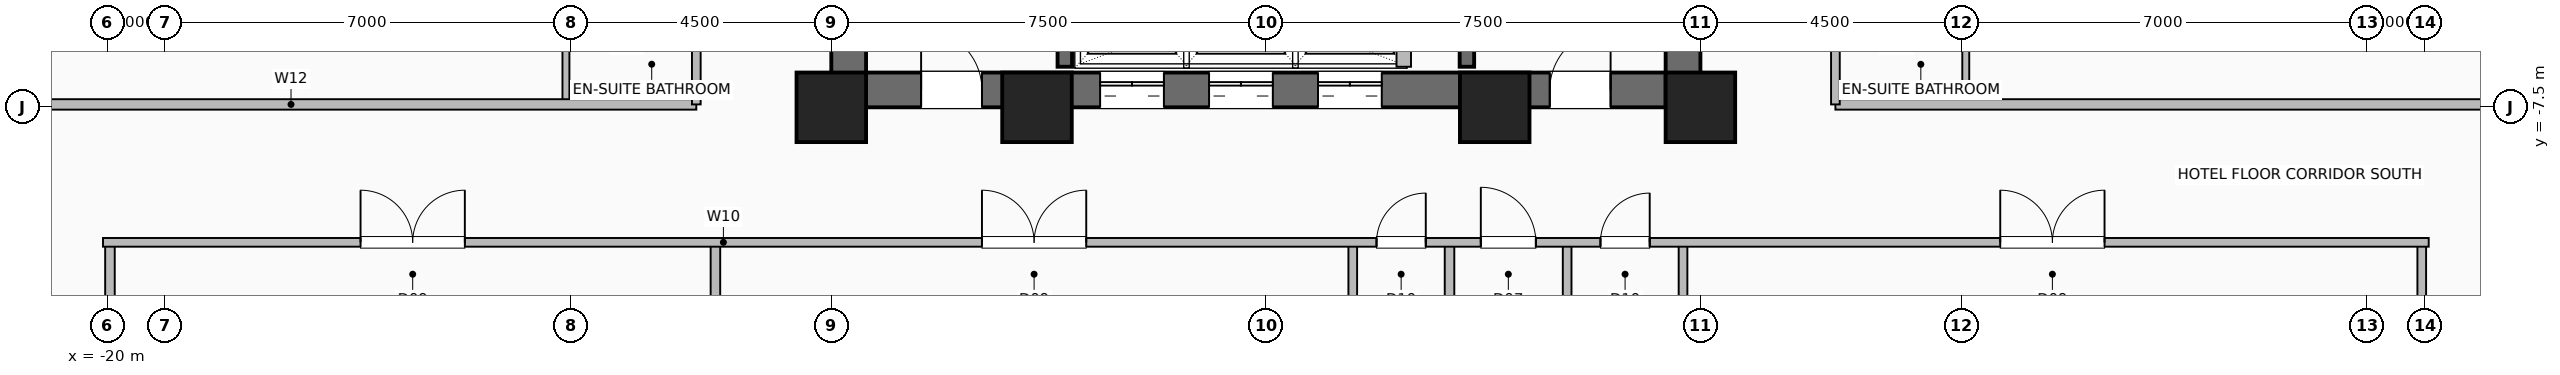
"""IFC4 building model, lengths in metres.
Left out: names, types, materials, properties, quantities, classifications, styles, units other than length and angle.
Written with IfcOpenShell. Run it as: python <this file> out.ifc"""

import sys

from ifc_helpers import new_model, si_unit, direction, frame, frame_2d, origin, origin_2d, place, context, subcontext, project, spatial, rectangle, hollow_rectangle, extrude, element, fill, save


model = new_model("IFC4")
c1 = context("Model", 3, precision=1e-05, world=origin(), true_north=direction((0.0, 1.0)))
c2 = subcontext(c1, "Body", "Model", "MODEL_VIEW")
j1 = project(units=[si_unit("LENGTHUNIT", "METRE"), si_unit("PLANEANGLEUNIT", "RADIAN")], contexts=[c1])
p1 = place(None, origin())
s1 = spatial("IfcSite", under=j1, at=p1, CompositionType="ELEMENT")
p2 = place(p1, origin())
s2 = spatial("IfcBuilding", under=s1, at=p2, CompositionType="ELEMENT")
p3 = place(p2, frame((0.0, 0.0, 51.5)))
s3 = spatial("IfcBuildingStorey", under=s2, at=p3, CompositionType="ELEMENT", Elevation=51.5)
for number, where, z_axis, x_axis in (
    (1, (-7.5, -7.5, 0.0), (0.0, 0.0, 1.0), (1.0, 0.0, 0.0)),
    (2, (-3.95, -7.5, 0.0), (0.0, 0.0, 1.0), (1.0, 0.0, 0.0)),
    (3, (3.95, -7.5, 0.0), (0.0, 0.0, 1.0), (1.0, 0.0, 0.0)),
    (4, (7.5, -7.5, 0.0), (0.0, 0.0, 1.0), (1.0, 0.0, 0.0)),
):
    element("IfcColumn", number, at=place(p3, frame(where, z_axis=z_axis, x_axis=x_axis)), inside=s3, PredefinedType="COLUMN", context=c2, shape_type="SweptSolid", body=[
        extrude(hollow_rectangle(XDim=1.2, YDim=1.2, WallThickness=0.055, at=origin_2d()), origin(), (0.0, 0.0, 1.0), 3.5),
    ])
p4 = place(p3, frame((-7.5, -7.2, 0.0), z_axis=(0.0, 0.0, 1.0), x_axis=(1.0, 0.0, 0.0)))
e5 = element("IfcWall", 5, at=p4, inside=s3, PredefinedType="SHEAR", context=c2, shape_type="SweptSolid", body=[
    extrude(rectangle(XDim=15.0, YDim=0.6, at=frame_2d((7.5, 0.0))), origin(), (0.0, 0.0, 1.0), 3.25),
])
p5 = place(p4, frame((1.55, 0.0, 0.0)))
e6 = element("IfcOpeningElement", 6, at=p5, cuts=e5, PredefinedType="OPENING", context=c2, shape_type="SweptSolid", body=[
    extrude(rectangle(XDim=1.05, YDim=2.08, at=frame_2d((0.525, 1.04))), frame((0.0, 0.31, 0.0), z_axis=(0.0, -1.0, 0.0), x_axis=(1.0, 0.0, 0.0)), (0.0, 0.0, 1.0), 0.62),
])
p6 = place(p4, frame((12.4, 0.0, 0.0)))
e7 = element("IfcOpeningElement", 7, at=p6, cuts=e5, PredefinedType="OPENING", context=c2, shape_type="SweptSolid", body=[
    extrude(rectangle(XDim=1.05, YDim=2.08, at=frame_2d((0.525, 1.04))), frame((0.0, 0.31, 0.0), z_axis=(0.0, -1.0, 0.0), x_axis=(1.0, 0.0, 0.0)), (0.0, 0.0, 1.0), 0.62),
])
p7 = place(p4, frame((4.64, 0.0, 0.0)))
e8 = element("IfcOpeningElement", 8, at=p7, cuts=e5, PredefinedType="OPENING", context=c2, shape_type="SweptSolid", body=[
    extrude(rectangle(XDim=1.1, YDim=2.2, at=frame_2d((0.55, 1.1))), frame((0.0, 0.31, 0.0), z_axis=(0.0, -1.0, 0.0), x_axis=(1.0, 0.0, 0.0)), (0.0, 0.0, 1.0), 0.62),
])
p8 = place(p4, frame((6.52, 0.0, 0.0)))
e9 = element("IfcOpeningElement", 9, at=p8, cuts=e5, PredefinedType="OPENING", context=c2, shape_type="SweptSolid", body=[
    extrude(rectangle(XDim=1.1, YDim=2.2, at=frame_2d((0.55, 1.1))), frame((0.0, 0.31, 0.0), z_axis=(0.0, -1.0, 0.0), x_axis=(1.0, 0.0, 0.0)), (0.0, 0.0, 1.0), 0.62),
])
p9 = place(p4, frame((8.4, 0.0, 0.0)))
e10 = element("IfcOpeningElement", 10, at=p9, cuts=e5, PredefinedType="OPENING", context=c2, shape_type="SweptSolid", body=[
    extrude(rectangle(XDim=1.1, YDim=2.2, at=frame_2d((0.55, 1.1))), frame((0.0, 0.31, 0.0), z_axis=(0.0, -1.0, 0.0), x_axis=(1.0, 0.0, 0.0)), (0.0, 0.0, 1.0), 0.62),
])
p10 = place(p3, frame((-7.2, -7.5, 0.0), z_axis=(0.0, 0.0, 1.0), x_axis=(0.0, 1.0, 0.0)))
e11 = element("IfcWall", 11, at=p10, inside=s3, PredefinedType="SHEAR", context=c2, shape_type="SweptSolid", body=[
    extrude(rectangle(XDim=15.0, YDim=0.6, at=frame_2d((7.5, 0.0))), origin(), (0.0, 0.0, 1.0), 3.25),
])
p11 = place(p10, frame((9.5, 0.0, 0.0)))
e12 = element("IfcOpeningElement", 12, at=p11, cuts=e11, PredefinedType="OPENING", context=c2, shape_type="SweptSolid", body=[
    extrude(rectangle(XDim=1.0, YDim=2.08, at=frame_2d((0.5, 1.04))), frame((0.0, 0.31, 0.0), z_axis=(0.0, -1.0, 0.0), x_axis=(1.0, 0.0, 0.0)), (0.0, 0.0, 1.0), 0.62),
])
p12 = place(p3, frame((7.2, -7.5, 0.0), z_axis=(0.0, 0.0, 1.0), x_axis=(0.0, 1.0, 0.0)))
e13 = element("IfcWall", 13, at=p12, inside=s3, PredefinedType="SHEAR", context=c2, shape_type="SweptSolid", body=[
    extrude(rectangle(XDim=15.0, YDim=0.6, at=frame_2d((7.5, 0.0))), origin(), (0.0, 0.0, 1.0), 3.25),
])
for number, where, z_axis, x_axis in (
    (14, (-3.47, -6.8, 0.0), (0.0, 0.0, 1.0), (0.0, 1.0, 0.0)),
    (15, (3.47, -6.8, 0.0), (0.0, 0.0, 1.0), (0.0, 1.0, 0.0)),
):
    element("IfcWall", number, at=place(p3, frame(where, z_axis=z_axis, x_axis=x_axis)), inside=s3, PredefinedType="SHEAR", context=c2, shape_type="SweptSolid", body=[
        extrude(rectangle(XDim=7.72, YDim=0.25, at=frame_2d((3.86, 0.0))), origin(), (0.0, 0.0, 1.0), 3.25),
    ])
p13 = place(p3, frame((2.38, -6.8, 0.0), z_axis=(0.0, 0.0, 1.0), x_axis=(0.0, 1.0, 0.0)))
e16 = element("IfcWall", 16, at=p13, inside=s3, PredefinedType="SHEAR", context=c2, shape_type="SweptSolid", body=[
    extrude(rectangle(XDim=2.22, YDim=0.25, at=frame_2d((1.11, 0.0))), origin(), (0.0, 0.0, 1.0), 3.25),
])
for number, where, z_axis, x_axis in (
    (17, (3.17, -23.82, 0.0), (0.0, 0.0, 1.0), (0.0, 1.0, 0.0)),
    (18, (-19.95, -23.82, 0.0), (0.0, 0.0, 1.0), (0.0, 1.0, 0.0)),
    (19, (-9.5, -23.82, 0.0), (0.0, 0.0, 1.0), (0.0, 1.0, 0.0)),
):
    element("IfcWall", number, at=place(p3, frame(where, z_axis=z_axis, x_axis=x_axis)), inside=s3, PredefinedType="PLUMBINGWALL", context=c2, shape_type="SweptSolid", body=[
        extrude(rectangle(XDim=13.99, YDim=0.165, at=frame_2d((6.995, 0.0))), origin(), (0.0, 0.0, 1.0), 3.25),
    ])
for number, where, z_axis, x_axis in (
    (20, (1.5, -23.82, 0.0), (0.0, 0.0, 1.0), (0.0, 1.0, 0.0)),
    (21, (5.2, -23.82, 0.0), (0.0, 0.0, 1.0), (0.0, 1.0, 0.0)),
    (22, (7.2, -23.82, 0.0), (0.0, 0.0, 1.0), (0.0, 1.0, 0.0)),
    (23, (19.95, -23.82, 0.0), (0.0, 0.0, 1.0), (0.0, 1.0, 0.0)),
):
    element("IfcWall", number, at=place(p3, frame(where, z_axis=z_axis, x_axis=x_axis)), inside=s3, PredefinedType="PARTITIONING", context=c2, shape_type="SweptSolid", body=[
        extrude(rectangle(XDim=13.99, YDim=0.15, at=frame_2d((6.995, 0.0))), origin(), (0.0, 0.0, 1.0), 3.25),
    ])
p14 = place(p3, frame((-20.07, -9.83, 0.0), z_axis=(0.0, 0.0, 1.0), x_axis=(1.0, 0.0, 0.0)))
e24 = element("IfcWall", 24, at=p14, inside=s3, PredefinedType="PARTITIONING", context=c2, shape_type="SweptSolid", body=[
    extrude(rectangle(XDim=40.14, YDim=0.15, at=frame_2d((20.07, 0.0))), origin(), (0.0, 0.0, 1.0), 3.25),
])
p15 = place(p14, frame((4.445, 0.0, 0.0)))
e25 = element("IfcOpeningElement", 25, at=p15, cuts=e24, PredefinedType="OPENING", context=c2, shape_type="SweptSolid", body=[
    extrude(rectangle(XDim=1.8, YDim=2.08, at=frame_2d((0.9, 1.04))), frame((0.0, 0.085, 0.0), z_axis=(0.0, -1.0, 0.0), x_axis=(1.0, 0.0, 0.0)), (0.0, 0.0, 1.0), 0.17),
])
p16 = place(p14, frame((15.17, 0.0, 0.0)))
e26 = element("IfcOpeningElement", 26, at=p16, cuts=e24, PredefinedType="OPENING", context=c2, shape_type="SweptSolid", body=[
    extrude(rectangle(XDim=1.8, YDim=2.08, at=frame_2d((0.9, 1.04))), frame((0.0, 0.085, 0.0), z_axis=(0.0, -1.0, 0.0), x_axis=(1.0, 0.0, 0.0)), (0.0, 0.0, 1.0), 0.17),
])
p17 = place(p14, frame((21.98, 0.0, 0.0)))
e27 = element("IfcOpeningElement", 27, at=p17, cuts=e24, PredefinedType="OPENING", context=c2, shape_type="SweptSolid", body=[
    extrude(rectangle(XDim=0.85, YDim=2.05, at=frame_2d((0.425, 1.025))), frame((0.0, 0.085, 0.0), z_axis=(0.0, -1.0, 0.0), x_axis=(1.0, 0.0, 0.0)), (0.0, 0.0, 1.0), 0.17),
])
p18 = place(p14, frame((23.78, 0.0, 0.0)))
e28 = element("IfcOpeningElement", 28, at=p18, cuts=e24, PredefinedType="OPENING", context=c2, shape_type="SweptSolid", body=[
    extrude(rectangle(XDim=0.95, YDim=2.06, at=frame_2d((0.475, 1.03))), frame((0.0, 0.085, 0.0), z_axis=(0.0, -1.0, 0.0), x_axis=(1.0, 0.0, 0.0)), (0.0, 0.0, 1.0), 0.17),
])
p19 = place(p14, frame((25.845, 0.0, 0.0)))
e29 = element("IfcOpeningElement", 29, at=p19, cuts=e24, PredefinedType="OPENING", context=c2, shape_type="SweptSolid", body=[
    extrude(rectangle(XDim=0.85, YDim=2.05, at=frame_2d((0.425, 1.025))), frame((0.0, 0.085, 0.0), z_axis=(0.0, -1.0, 0.0), x_axis=(1.0, 0.0, 0.0)), (0.0, 0.0, 1.0), 0.17),
])
p20 = place(p14, frame((32.745, 0.0, 0.0)))
e30 = element("IfcOpeningElement", 30, at=p20, cuts=e24, PredefinedType="OPENING", context=c2, shape_type="SweptSolid", body=[
    extrude(rectangle(XDim=1.8, YDim=2.08, at=frame_2d((0.9, 1.04))), frame((0.0, 0.085, 0.0), z_axis=(0.0, -1.0, 0.0), x_axis=(1.0, 0.0, 0.0)), (0.0, 0.0, 1.0), 0.17),
])
p21 = place(p3, frame((-12.08, -7.42, 0.0), z_axis=(0.0, 0.0, 1.0), x_axis=(0.0, 1.0, 0.0)))
e31 = element("IfcWall", 31, at=p21, inside=s3, PredefinedType="PLUMBINGWALL", context=c2, shape_type="SweptSolid", body=[
    extrude(rectangle(XDim=2.008, YDim=0.12, at=frame_2d((1.004, 0.0))), origin(), (0.0, 0.0, 1.0), 3.25),
])
p22 = place(p3, frame((-23.82, -7.45, 0.0), z_axis=(0.0, 0.0, 1.0), x_axis=(1.0, 0.0, 0.0)))
e32 = element("IfcWall", 32, at=p22, inside=s3, PredefinedType="PARTITIONING", context=c2, shape_type="SweptSolid", body=[
    extrude(rectangle(XDim=13.99, YDim=0.18, at=frame_2d((6.995, 0.0))), origin(), (0.0, 0.0, 1.0), 3.25),
])
p23 = place(p3, frame((-9.83, -7.45, 0.0), z_axis=(0.0, 0.0, 1.0), x_axis=(0.0, 1.0, 0.0)))
e33 = element("IfcWall", 33, at=p23, inside=s3, PredefinedType="PARTITIONING", context=c2, shape_type="SweptSolid", body=[
    extrude(rectangle(XDim=14.9, YDim=0.15, at=frame_2d((7.45, 0.0))), origin(), (0.0, 0.0, 1.0), 3.25),
])
p24 = place(p23, frame((3.049, 0.0, 0.0)))
e34 = element("IfcOpeningElement", 34, at=p24, cuts=e33, PredefinedType="OPENING", context=c2, shape_type="SweptSolid", body=[
    extrude(rectangle(XDim=0.95, YDim=2.08, at=frame_2d((0.475, 1.04))), frame((0.0, 0.085, 0.0), z_axis=(0.0, -1.0, 0.0), x_axis=(1.0, 0.0, 0.0)), (0.0, 0.0, 1.0), 0.17),
])
p25 = place(p23, frame((7.927, 0.0, 0.0)))
e35 = element("IfcOpeningElement", 35, at=p25, cuts=e33, PredefinedType="OPENING", context=c2, shape_type="SweptSolid", body=[
    extrude(rectangle(XDim=0.95, YDim=2.08, at=frame_2d((0.475, 1.04))), frame((0.0, 0.085, 0.0), z_axis=(0.0, -1.0, 0.0), x_axis=(1.0, 0.0, 0.0)), (0.0, 0.0, 1.0), 0.17),
])
p26 = place(p23, frame((12.899, 0.0, 0.0)))
e36 = element("IfcOpeningElement", 36, at=p26, cuts=e33, PredefinedType="OPENING", context=c2, shape_type="SweptSolid", body=[
    extrude(rectangle(XDim=0.95, YDim=2.08, at=frame_2d((0.475, 1.04))), frame((0.0, 0.085, 0.0), z_axis=(0.0, -1.0, 0.0), x_axis=(1.0, 0.0, 0.0)), (0.0, 0.0, 1.0), 0.17),
])
p27 = place(p3, frame((12.08, -7.42, 0.0), z_axis=(0.0, 0.0, 1.0), x_axis=(0.0, 1.0, 0.0)))
e37 = element("IfcWall", 37, at=p27, inside=s3, PredefinedType="PLUMBINGWALL", context=c2, shape_type="SweptSolid", body=[
    extrude(rectangle(XDim=2.008, YDim=0.12, at=frame_2d((1.004, 0.0))), origin(), (0.0, 0.0, 1.0), 3.25),
])
p28 = place(p3, frame((9.83, -7.45, 0.0), z_axis=(0.0, 0.0, 1.0), x_axis=(1.0, 0.0, 0.0)))
e38 = element("IfcWall", 38, at=p28, inside=s3, PredefinedType="PARTITIONING", context=c2, shape_type="SweptSolid", body=[
    extrude(rectangle(XDim=13.99, YDim=0.18, at=frame_2d((6.995, 0.0))), origin(), (0.0, 0.0, 1.0), 3.25),
])
p29 = place(p3, frame((9.83, -7.45, 0.0), z_axis=(0.0, 0.0, 1.0), x_axis=(0.0, 1.0, 0.0)))
e39 = element("IfcWall", 39, at=p29, inside=s3, PredefinedType="PARTITIONING", context=c2, shape_type="SweptSolid", body=[
    extrude(rectangle(XDim=14.9, YDim=0.15, at=frame_2d((7.45, 0.0))), origin(), (0.0, 0.0, 1.0), 3.25),
])
p30 = place(p29, frame((3.049, 0.0, 0.0)))
e40 = element("IfcOpeningElement", 40, at=p30, cuts=e39, PredefinedType="OPENING", context=c2, shape_type="SweptSolid", body=[
    extrude(rectangle(XDim=0.95, YDim=2.08, at=frame_2d((0.475, 1.04))), frame((0.0, 0.085, 0.0), z_axis=(0.0, -1.0, 0.0), x_axis=(1.0, 0.0, 0.0)), (0.0, 0.0, 1.0), 0.17),
])
p31 = place(p29, frame((7.927, 0.0, 0.0)))
e41 = element("IfcOpeningElement", 41, at=p31, cuts=e39, PredefinedType="OPENING", context=c2, shape_type="SweptSolid", body=[
    extrude(rectangle(XDim=0.95, YDim=2.08, at=frame_2d((0.475, 1.04))), frame((0.0, 0.085, 0.0), z_axis=(0.0, -1.0, 0.0), x_axis=(1.0, 0.0, 0.0)), (0.0, 0.0, 1.0), 0.17),
])
p32 = place(p29, frame((12.899, 0.0, 0.0)))
e42 = element("IfcOpeningElement", 42, at=p32, cuts=e39, PredefinedType="OPENING", context=c2, shape_type="SweptSolid", body=[
    extrude(rectangle(XDim=0.95, YDim=2.08, at=frame_2d((0.475, 1.04))), frame((0.0, 0.085, 0.0), z_axis=(0.0, -1.0, 0.0), x_axis=(1.0, 0.0, 0.0)), (0.0, 0.0, 1.0), 0.17),
])
p33 = place(p5, origin())
e43 = element("IfcDoor", 43, at=p33, inside=s3, OperationType="SINGLE_SWING_LEFT", PredefinedType="DOOR", context=c2, shape_type="SweptSolid", body=[
    extrude(rectangle(XDim=1.05, YDim=2.08, at=frame_2d((0.525, 1.04))), frame((0.0, 0.025, 0.0), z_axis=(0.0, -1.0, 0.0), x_axis=(1.0, 0.0, 0.0)), (0.0, 0.0, 1.0), 0.05),
])
fill(e6, e43)
p34 = place(p6, origin())
e44 = element("IfcDoor", 44, at=p34, inside=s3, OperationType="SINGLE_SWING_RIGHT", PredefinedType="DOOR", context=c2, shape_type="SweptSolid", body=[
    extrude(rectangle(XDim=1.05, YDim=2.08, at=frame_2d((0.525, 1.04))), frame((0.0, 0.025, 0.0), z_axis=(0.0, -1.0, 0.0), x_axis=(1.0, 0.0, 0.0)), (0.0, 0.0, 1.0), 0.05),
])
fill(e7, e44)
p35 = place(p7, origin())
e45 = element("IfcDoor", 45, at=p35, inside=s3, OperationType="DOUBLE_DOOR_SLIDING", PredefinedType="DOOR", context=c2, shape_type="SweptSolid", body=[
    extrude(rectangle(XDim=1.1, YDim=2.2, at=frame_2d((0.55, 1.1))), frame((0.0, 0.025, 0.0), z_axis=(0.0, -1.0, 0.0), x_axis=(1.0, 0.0, 0.0)), (0.0, 0.0, 1.0), 0.05),
])
fill(e8, e45)
p36 = place(p8, origin())
e46 = element("IfcDoor", 46, at=p36, inside=s3, OperationType="DOUBLE_DOOR_SLIDING", PredefinedType="DOOR", context=c2, shape_type="SweptSolid", body=[
    extrude(rectangle(XDim=1.1, YDim=2.2, at=frame_2d((0.55, 1.1))), frame((0.0, 0.025, 0.0), z_axis=(0.0, -1.0, 0.0), x_axis=(1.0, 0.0, 0.0)), (0.0, 0.0, 1.0), 0.05),
])
fill(e9, e46)
p37 = place(p9, origin())
e47 = element("IfcDoor", 47, at=p37, inside=s3, OperationType="DOUBLE_DOOR_SLIDING", PredefinedType="DOOR", context=c2, shape_type="SweptSolid", body=[
    extrude(rectangle(XDim=1.1, YDim=2.2, at=frame_2d((0.55, 1.1))), frame((0.0, 0.025, 0.0), z_axis=(0.0, -1.0, 0.0), x_axis=(1.0, 0.0, 0.0)), (0.0, 0.0, 1.0), 0.05),
])
fill(e10, e47)
p38 = place(p15, origin())
e48 = element("IfcDoor", 48, at=p38, inside=s3, OperationType="DOUBLE_DOOR_SINGLE_SWING", PredefinedType="DOOR", context=c2, shape_type="SweptSolid", body=[
    extrude(rectangle(XDim=1.8, YDim=2.08, at=frame_2d((0.9, 1.04))), frame((0.0, 0.025, 0.0), z_axis=(0.0, -1.0, 0.0), x_axis=(1.0, 0.0, 0.0)), (0.0, 0.0, 1.0), 0.05),
])
fill(e25, e48)
p39 = place(p16, origin())
e49 = element("IfcDoor", 49, at=p39, inside=s3, OperationType="DOUBLE_DOOR_SINGLE_SWING", PredefinedType="DOOR", context=c2, shape_type="SweptSolid", body=[
    extrude(rectangle(XDim=1.8, YDim=2.08, at=frame_2d((0.9, 1.04))), frame((0.0, 0.025, 0.0), z_axis=(0.0, -1.0, 0.0), x_axis=(1.0, 0.0, 0.0)), (0.0, 0.0, 1.0), 0.05),
])
fill(e26, e49)
p40 = place(p17, origin())
e50 = element("IfcDoor", 50, at=p40, inside=s3, OperationType="SINGLE_SWING_RIGHT", PredefinedType="DOOR", context=c2, shape_type="SweptSolid", body=[
    extrude(rectangle(XDim=0.85, YDim=2.05, at=frame_2d((0.425, 1.025))), frame((0.0, 0.025, 0.0), z_axis=(0.0, -1.0, 0.0), x_axis=(1.0, 0.0, 0.0)), (0.0, 0.0, 1.0), 0.05),
])
fill(e27, e50)
p41 = place(p18, origin())
e51 = element("IfcDoor", 51, at=p41, inside=s3, OperationType="SINGLE_SWING_LEFT", PredefinedType="DOOR", context=c2, shape_type="SweptSolid", body=[
    extrude(rectangle(XDim=0.95, YDim=2.06, at=frame_2d((0.475, 1.03))), frame((0.0, 0.025, 0.0), z_axis=(0.0, -1.0, 0.0), x_axis=(1.0, 0.0, 0.0)), (0.0, 0.0, 1.0), 0.05),
])
fill(e28, e51)
p42 = place(p19, origin())
e52 = element("IfcDoor", 52, at=p42, inside=s3, OperationType="SINGLE_SWING_RIGHT", PredefinedType="DOOR", context=c2, shape_type="SweptSolid", body=[
    extrude(rectangle(XDim=0.85, YDim=2.05, at=frame_2d((0.425, 1.025))), frame((0.0, 0.025, 0.0), z_axis=(0.0, -1.0, 0.0), x_axis=(1.0, 0.0, 0.0)), (0.0, 0.0, 1.0), 0.05),
])
fill(e29, e52)
p43 = place(p20, origin())
e53 = element("IfcDoor", 53, at=p43, inside=s3, OperationType="DOUBLE_DOOR_SINGLE_SWING", PredefinedType="DOOR", context=c2, shape_type="SweptSolid", body=[
    extrude(rectangle(XDim=1.8, YDim=2.08, at=frame_2d((0.9, 1.04))), frame((0.0, 0.025, 0.0), z_axis=(0.0, -1.0, 0.0), x_axis=(1.0, 0.0, 0.0)), (0.0, 0.0, 1.0), 0.05),
])
fill(e30, e53)
save(model, sys.argv[1])
